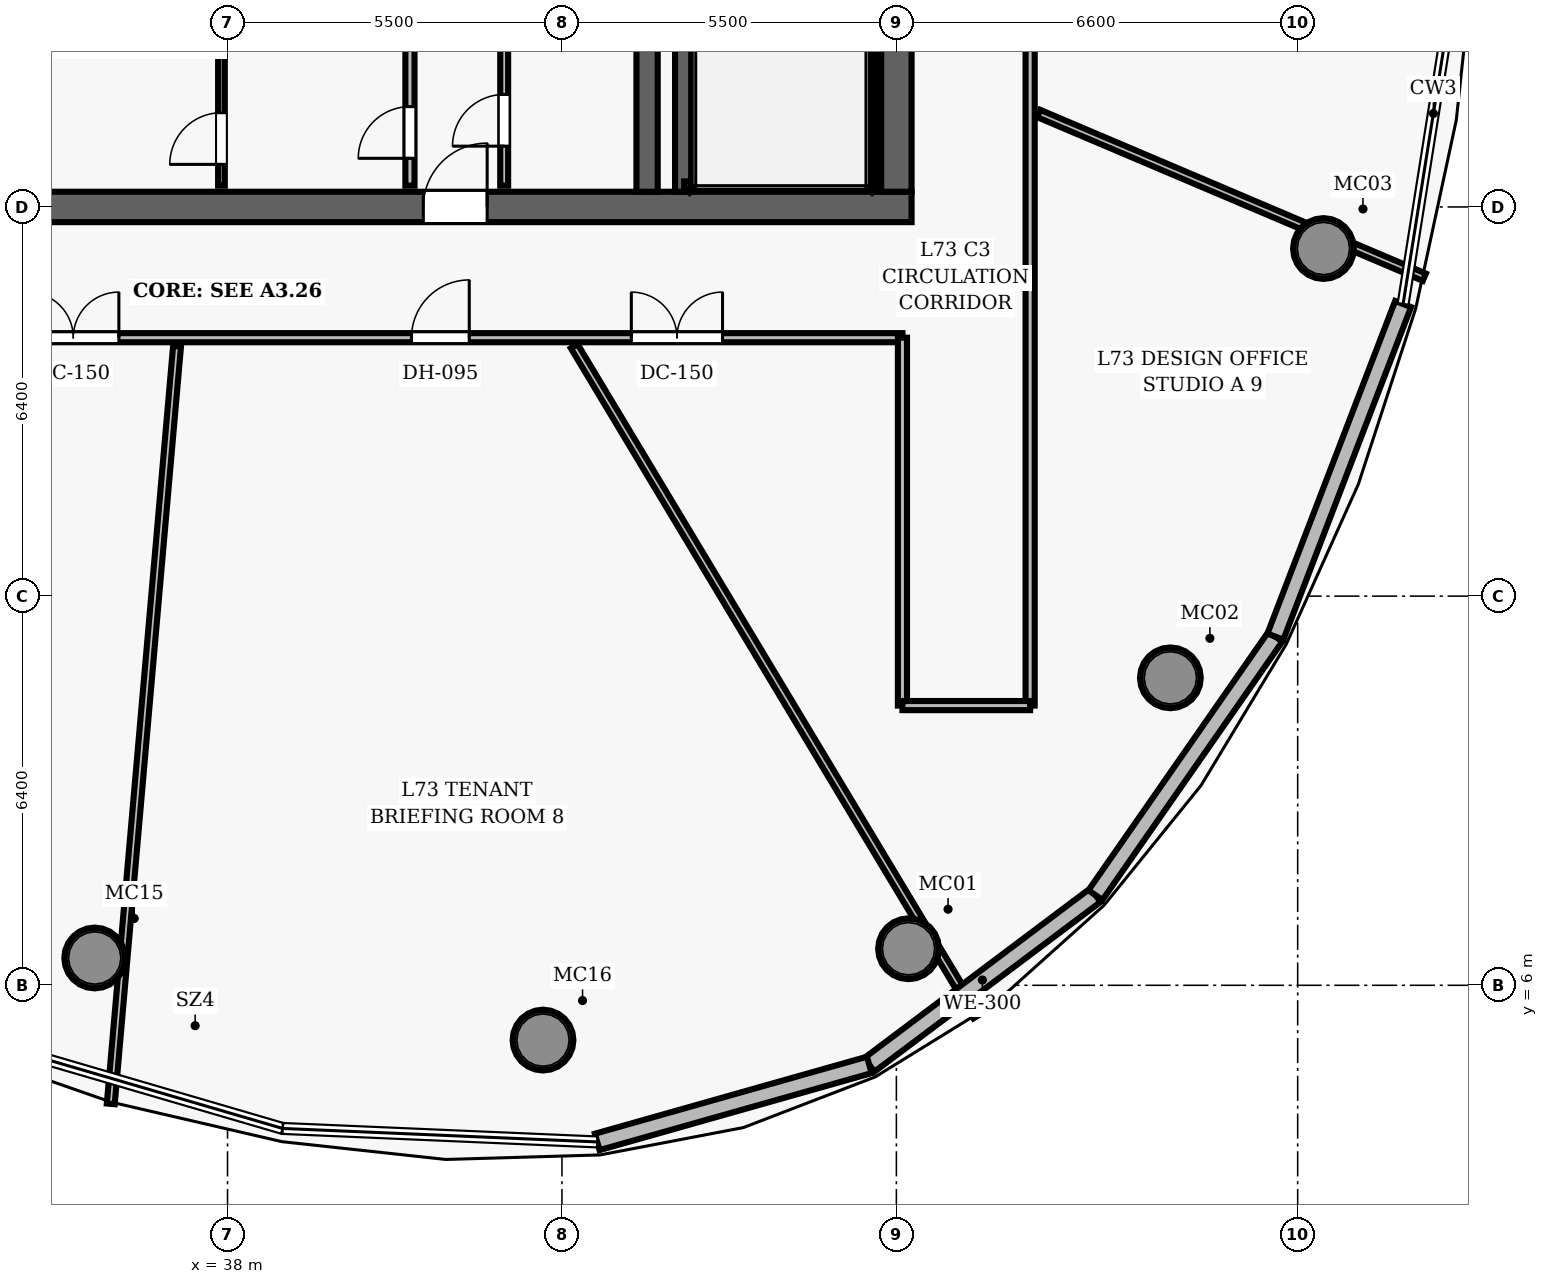
"""IFC4 building model, lengths in metres.
Left out: names, types, materials, properties, quantities, classifications, styles, units other than length and angle.
Written with IfcOpenShell. Run it as: python <this file> out.ifc"""

import sys

from ifc_helpers import new_model, si_unit, direction, frame, frame_2d, origin, origin_2d, place, context, subcontext, project, spatial, rectangle, hollow_circle, extrude, element, fill, save


model = new_model("IFC4")
c1 = context("Model", 3, precision=1e-05, world=origin(), true_north=direction((0.0, 1.0)))
c2 = subcontext(c1, "Body", "Model", "MODEL_VIEW")
j1 = project(units=[si_unit("LENGTHUNIT", "METRE"), si_unit("PLANEANGLEUNIT", "RADIAN")], contexts=[c1])
p1 = place(None, origin())
s1 = spatial("IfcSite", under=j1, at=p1, CompositionType="ELEMENT")
p2 = place(p1, origin())
s2 = spatial("IfcBuilding", under=s1, at=p2, CompositionType="ELEMENT")
p3 = place(p2, frame((0.0, 0.0, 288.25)))
s3 = spatial("IfcBuildingStorey", under=s2, at=p3, CompositionType="ELEMENT", Elevation=288.25)
p4 = place(p3, frame((26.75, 18.8, 0.0), z_axis=(0.0, 0.0, 1.0), x_axis=(1.0, 0.0, 0.0)))
e1 = element("IfcWall", 1, at=p4, inside=s3, PredefinedType="SHEAR", context=c2, shape_type="SweptSolid", body=[
    extrude(rectangle(XDim=22.5, YDim=0.5, at=frame_2d((11.25, 0.0))), origin(), (0.0, 0.0, 1.0), 3.85),
])
p5 = place(p4, frame((14.47, 0.0, 0.0)))
e2 = element("IfcOpeningElement", 2, at=p5, cuts=e1, PredefinedType="OPENING", context=c2, shape_type="SweptSolid", body=[
    extrude(rectangle(XDim=1.05, YDim=2.15, at=frame_2d((0.525, 1.075))), frame((0.0, 0.26, 0.0), z_axis=(0.0, -1.0, 0.0), x_axis=(1.0, 0.0, 0.0)), (0.0, 0.0, 1.0), 0.52),
])
p6 = place(p3, frame((49.0, 19.05, 0.0), z_axis=(0.0, 0.0, 1.0), x_axis=(0.0, 1.0, 0.0)))
e3 = element("IfcWall", 3, at=p6, inside=s3, PredefinedType="SHEAR", context=c2, shape_type="SweptSolid", body=[
    extrude(rectangle(XDim=13.9, YDim=0.5, at=frame_2d((6.95, 0.0))), origin(), (0.0, 0.0, 1.0), 3.85),
])
p7 = place(p6, frame((8.2, 0.0, 0.0)))
e4 = element("IfcOpeningElement", 4, at=p7, cuts=e3, PredefinedType="OPENING", context=c2, shape_type="SweptSolid", body=[
    extrude(rectangle(XDim=1.05, YDim=2.15, at=frame_2d((0.525, 1.075))), frame((0.0, 0.26, 0.0), z_axis=(0.0, -1.0, 0.0), x_axis=(1.0, 0.0, 0.0)), (0.0, 0.0, 1.0), 0.52),
])
p8 = place(p3, frame((44.9, 19.05, 0.0), z_axis=(0.0, 0.0, 1.0), x_axis=(0.0, 1.0, 0.0)))
e5 = element("IfcWall", 5, at=p8, inside=s3, PredefinedType="SHEAR", context=c2, shape_type="SweptSolid", body=[
    extrude(rectangle(XDim=13.9, YDim=0.35, at=frame_2d((6.95, 0.0))), origin(), (0.0, 0.0, 1.0), 3.85),
])
for number, where, z_axis, x_axis in (
    (6, (49.2, 6.601, 0.0), (0.0, 0.0, 1.0), (1.0, 0.0, 0.0)),
    (7, (53.506, 11.056, 0.0), (0.0, 0.0, 1.0), (1.0, 0.0, 0.0)),
    (8, (56.024, 18.116, 0.0), (0.0, 0.0, 1.0), (1.0, 0.0, 0.0)),
    (9, (35.815, 6.449, 0.0), (0.0, 0.0, 1.0), (1.0, 0.0, 0.0)),
    (10, (43.188, 5.099, 0.0), (0.0, 0.0, 1.0), (1.0, 0.0, 0.0)),
):
    element("IfcColumn", number, at=place(p3, frame(where, z_axis=z_axis, x_axis=x_axis)), inside=s3, PredefinedType="COLUMN", context=c2, shape_type="SweptSolid", body=[
        extrude(hollow_circle(Radius=0.5, WallThickness=0.045, at=origin_2d()), origin(), (0.0, 0.0, 1.0), 3.85),
    ])
p9 = place(p3, frame((45.51, 19.05, 0.0), z_axis=(0.0, 0.0, 1.0), x_axis=(0.0, 1.0, 0.0)))
e11 = element("IfcWall", 11, at=p9, inside=s3, PredefinedType="SHEAR", context=c2, shape_type="SweptSolid", body=[
    extrude(rectangle(XDim=7.5, YDim=0.3, at=frame_2d((3.75, 0.0))), origin(), (0.0, 0.0, 1.0), 3.85),
])
p10 = place(p3, frame((48.605, 19.1, 0.0), z_axis=(0.0, 0.0, 1.0), x_axis=(0.0, 1.0, 0.0)))
e12 = element("IfcWall", 12, at=p10, inside=s3, PredefinedType="SHEAR", context=c2, shape_type="SweptSolid", body=[
    extrude(rectangle(XDim=7.45, YDim=0.12, at=frame_2d((3.725, 0.0))), origin(), (0.0, 0.0, 1.0), 3.85),
])
p11 = place(p3, frame((45.51, 19.16, 0.0), z_axis=(0.0, 0.0, 1.0), x_axis=(1.0, 0.0, 0.0)))
e13 = element("IfcWall", 13, at=p11, inside=s3, PredefinedType="SHEAR", context=c2, shape_type="SweptSolid", body=[
    extrude(rectangle(XDim=3.095, YDim=0.12, at=frame_2d((1.547, 0.0))), origin(), (0.0, 0.0, 1.0), 3.85),
])
p12 = place(p3, frame((41.0, 19.15, 0.0), z_axis=(0.0, 0.0, 1.0), x_axis=(0.0, 1.0, 0.0)))
e14 = element("IfcWall", 14, at=p12, inside=s3, PredefinedType="PARTITIONING", context=c2, shape_type="SweptSolid", body=[
    extrude(rectangle(XDim=7.95, YDim=0.15, at=frame_2d((3.975, 0.0))), origin(), (0.0, 0.0, 1.0), 3.04),
])
p13 = place(p12, frame((4.425, 0.0, 0.0)))
e15 = element("IfcOpeningElement", 15, at=p13, cuts=e14, PredefinedType="OPENING", context=c2, shape_type="SweptSolid", body=[
    extrude(rectangle(XDim=0.85, YDim=2.1, at=frame_2d((0.425, 1.05))), frame((0.0, 0.085, 0.0), z_axis=(0.0, -1.0, 0.0), x_axis=(1.0, 0.0, 0.0)), (0.0, 0.0, 1.0), 0.17),
])
p14 = place(p12, frame((0.45, 0.0, 0.0)))
e16 = element("IfcOpeningElement", 16, at=p14, cuts=e14, PredefinedType="OPENING", context=c2, shape_type="SweptSolid", body=[
    extrude(rectangle(XDim=0.85, YDim=2.1, at=frame_2d((0.425, 1.05))), frame((0.0, 0.085, 0.0), z_axis=(0.0, -1.0, 0.0), x_axis=(1.0, 0.0, 0.0)), (0.0, 0.0, 1.0), 0.17),
])
p15 = place(p3, frame((37.9, 19.15, 0.0), z_axis=(0.0, 0.0, 1.0), x_axis=(0.0, 1.0, 0.0)))
e17 = element("IfcWall", 17, at=p15, inside=s3, PredefinedType="PARTITIONING", context=c2, shape_type="SweptSolid", body=[
    extrude(rectangle(XDim=3.975, YDim=0.11, at=frame_2d((1.988, 0.0))), origin(), (0.0, 0.0, 1.0), 3.04),
])
p16 = place(p15, frame((0.35, 0.0, 0.0)))
e18 = element("IfcOpeningElement", 18, at=p16, cuts=e17, PredefinedType="OPENING", context=c2, shape_type="SweptSolid", body=[
    extrude(rectangle(XDim=0.85, YDim=2.1, at=frame_2d((0.425, 1.05))), frame((0.0, 0.065, 0.0), z_axis=(0.0, -1.0, 0.0), x_axis=(1.0, 0.0, 0.0)), (0.0, 0.0, 1.0), 0.13),
])
p17 = place(p3, frame((42.55, 19.15, 0.0), z_axis=(0.0, 0.0, 1.0), x_axis=(0.0, 1.0, 0.0)))
e19 = element("IfcWall", 19, at=p17, inside=s3, PredefinedType="PARTITIONING", context=c2, shape_type="SweptSolid", body=[
    extrude(rectangle(XDim=2.75, YDim=0.13, at=frame_2d((1.375, 0.0))), origin(), (0.0, 0.0, 1.0), 3.04),
])
p18 = place(p17, frame((0.65, 0.0, 0.0)))
e20 = element("IfcOpeningElement", 20, at=p18, cuts=e19, PredefinedType="OPENING", context=c2, shape_type="SweptSolid", body=[
    extrude(rectangle(XDim=0.85, YDim=2.1, at=frame_2d((0.425, 1.05))), frame((0.0, 0.075, 0.0), z_axis=(0.0, -1.0, 0.0), x_axis=(1.0, 0.0, 0.0)), (0.0, 0.0, 1.0), 0.15),
])
p19 = place(p3, frame((26.9, 16.65, 0.0), z_axis=(0.0, 0.0, 1.0), x_axis=(1.0, 0.0, 0.0)))
e21 = element("IfcWall", 21, at=p19, inside=s3, PredefinedType="PARTITIONING", context=c2, shape_type="SweptSolid", body=[
    extrude(rectangle(XDim=22.2, YDim=0.15, at=frame_2d((11.1, 0.0))), origin(), (0.0, 0.0, 1.0), 3.04),
])
p20 = place(p19, frame((7.813, 0.0, 0.0)))
e22 = element("IfcOpeningElement", 22, at=p20, cuts=e21, PredefinedType="OPENING", context=c2, shape_type="SweptSolid", body=[
    extrude(rectangle(XDim=1.5, YDim=2.2, at=frame_2d((0.75, 1.1))), frame((0.0, 0.085, 0.0), z_axis=(0.0, -1.0, 0.0), x_axis=(1.0, 0.0, 0.0)), (0.0, 0.0, 1.0), 0.17),
])
p21 = place(p19, frame((14.125, 0.0, 0.0)))
e23 = element("IfcOpeningElement", 23, at=p21, cuts=e21, PredefinedType="OPENING", context=c2, shape_type="SweptSolid", body=[
    extrude(rectangle(XDim=0.95, YDim=2.15, at=frame_2d((0.475, 1.075))), frame((0.0, 0.085, 0.0), z_axis=(0.0, -1.0, 0.0), x_axis=(1.0, 0.0, 0.0)), (0.0, 0.0, 1.0), 0.17),
])
p22 = place(p19, frame((17.741, 0.0, 0.0)))
e24 = element("IfcOpeningElement", 24, at=p22, cuts=e21, PredefinedType="OPENING", context=c2, shape_type="SweptSolid", body=[
    extrude(rectangle(XDim=1.5, YDim=2.2, at=frame_2d((0.75, 1.1))), frame((0.0, 0.085, 0.0), z_axis=(0.0, -1.0, 0.0), x_axis=(1.0, 0.0, 0.0)), (0.0, 0.0, 1.0), 0.17),
])
p23 = place(p3, frame((51.2, 10.6, 0.0), z_axis=(0.0, 0.0, 1.0), x_axis=(0.0, 1.0, 0.0)))
e25 = element("IfcWall", 25, at=p23, inside=s3, PredefinedType="PARTITIONING", context=c2, shape_type="SweptSolid", body=[
    extrude(rectangle(XDim=30.8, YDim=0.15, at=frame_2d((15.4, 0.0))), origin(), (0.0, 0.0, 1.0), 3.04),
])
p24 = place(p23, frame((20.584, 0.0, 0.0)))
e26 = element("IfcOpeningElement", 26, at=p24, cuts=e25, PredefinedType="OPENING", context=c2, shape_type="SweptSolid", body=[
    extrude(rectangle(XDim=1.5, YDim=2.2, at=frame_2d((0.75, 1.1))), frame((0.0, 0.085, 0.0), z_axis=(0.0, -1.0, 0.0), x_axis=(1.0, 0.0, 0.0)), (0.0, 0.0, 1.0), 0.17),
])
p25 = place(p23, frame((11.03, 0.0, 0.0)))
e27 = element("IfcOpeningElement", 27, at=p25, cuts=e25, PredefinedType="OPENING", context=c2, shape_type="SweptSolid", body=[
    extrude(rectangle(XDim=1.5, YDim=2.2, at=frame_2d((0.75, 1.1))), frame((0.0, 0.085, 0.0), z_axis=(0.0, -1.0, 0.0), x_axis=(1.0, 0.0, 0.0)), (0.0, 0.0, 1.0), 0.17),
])
p26 = place(p3, frame((49.1, 10.6, 0.0), z_axis=(0.0, 0.0, 1.0), x_axis=(0.0, 1.0, 0.0)))
e28 = element("IfcWall", 28, at=p26, inside=s3, PredefinedType="PARTITIONING", context=c2, shape_type="SweptSolid", body=[
    extrude(rectangle(XDim=6.05, YDim=0.15, at=frame_2d((3.025, 0.0))), origin(), (0.0, 0.0, 1.0), 3.04),
])
p27 = place(p3, frame((49.1, 10.6, 0.0), z_axis=(0.0, 0.0, 1.0), x_axis=(1.0, 0.0, 0.0)))
e29 = element("IfcWall", 29, at=p27, inside=s3, PredefinedType="PARTITIONING", context=c2, shape_type="SweptSolid", body=[
    extrude(rectangle(XDim=2.1, YDim=0.15, at=frame_2d((1.05, 0.0))), origin(), (0.0, 0.0, 1.0), 3.04),
])
p28 = place(p3, frame((37.17, 16.51, 0.0), z_axis=(0.0, 0.0, 1.0), x_axis=(-0.087154359031, -0.99619481915, 0.0)))
e30 = element("IfcWall", 30, at=p28, inside=s3, PredefinedType="PARTITIONING", context=c2, shape_type="SweptSolid", body=[
    extrude(rectangle(XDim=12.508, YDim=0.13, at=frame_2d((6.254, 0.0))), origin(), (0.0, 0.0, 1.0), 3.04),
])
p29 = place(p3, frame((43.702, 16.51, 0.0), z_axis=(0.0, 0.0, 1.0), x_axis=(0.515034621958, -0.857169375436, 0.0)))
e31 = element("IfcWall", 31, at=p29, inside=s3, PredefinedType="PARTITIONING", context=c2, shape_type="SweptSolid", body=[
    extrude(rectangle(XDim=12.857, YDim=0.13, at=frame_2d((6.428, 0.0))), origin(), (0.0, 0.0, 1.0), 3.04),
])
p30 = place(p3, frame((51.34, 20.337, 0.0), z_axis=(0.0, 0.0, 1.0), x_axis=(0.920508424037, -0.390722716612, 0.0)))
e32 = element("IfcWall", 32, at=p30, inside=s3, PredefinedType="PARTITIONING", context=c2, shape_type="SweptSolid", body=[
    extrude(rectangle(XDim=6.891, YDim=0.13, at=frame_2d((3.445, 0.0))), origin(), (0.0, 0.0, 1.0), 3.04),
])
p31 = place(p3, frame((52.274, 7.483, 0.0), z_axis=(0.0, 0.0, 1.0), x_axis=(-0.799735338647, -0.600352719756, 0.0)))
e33 = element("IfcWall", 33, at=p31, inside=s3, PredefinedType="SOLIDWALL", context=c2, shape_type="SweptSolid", body=[
    extrude(rectangle(XDim=4.651, YDim=0.28, at=frame_2d((2.325, 0.0))), origin(), (0.0, 0.0, 1.0), 3.625),
])
p32 = place(p3, frame((55.233, 11.733, 0.0), z_axis=(0.0, 0.0, 1.0), x_axis=(-0.571372443158, -0.820690886509, 0.0)))
e34 = element("IfcWall", 34, at=p32, inside=s3, PredefinedType="SOLIDWALL", context=c2, shape_type="SweptSolid", body=[
    extrude(rectangle(XDim=5.179, YDim=0.28, at=frame_2d((2.59, 0.0))), origin(), (0.0, 0.0, 1.0), 3.625),
])
p33 = place(p3, frame((57.334, 17.204, 0.0), z_axis=(0.0, 0.0, 1.0), x_axis=(-0.358468117359, -0.93354196951, 0.0)))
e35 = element("IfcWall", 35, at=p33, inside=s3, PredefinedType="SOLIDWALL", context=c2, shape_type="SweptSolid", body=[
    extrude(rectangle(XDim=5.86, YDim=0.28, at=frame_2d((2.93, 0.0))), origin(), (0.0, 0.0, 1.0), 3.625),
])
p34 = place(p3, frame((48.555, 4.691, 0.0), z_axis=(0.0, 0.0, 1.0), x_axis=(-0.962194624713, -0.272362817165, 0.0)))
e36 = element("IfcWall", 36, at=p34, inside=s3, PredefinedType="SOLIDWALL", context=c2, shape_type="SweptSolid", body=[
    extrude(rectangle(XDim=4.65, YDim=0.28, at=frame_2d((2.325, 0.0))), origin(), (0.0, 0.0, 1.0), 3.625),
])
p35 = place(p5, origin())
e37 = element("IfcDoor", 37, at=p35, inside=s3, OperationType="SINGLE_SWING_RIGHT", PredefinedType="DOOR", context=c2, shape_type="SweptSolid", body=[
    extrude(rectangle(XDim=1.05, YDim=2.15, at=frame_2d((0.525, 1.075))), frame((0.0, 0.025, 0.0), z_axis=(0.0, -1.0, 0.0), x_axis=(1.0, 0.0, 0.0)), (0.0, 0.0, 1.0), 0.05),
])
fill(e2, e37)
p36 = place(p14, origin())
e38 = element("IfcDoor", 38, at=p36, inside=s3, OperationType="SINGLE_SWING_LEFT", PredefinedType="DOOR", context=c2, shape_type="SweptSolid", body=[
    extrude(rectangle(XDim=0.85, YDim=2.1, at=frame_2d((0.425, 1.05))), frame((0.0, 0.025, 0.0), z_axis=(0.0, -1.0, 0.0), x_axis=(1.0, 0.0, 0.0)), (0.0, 0.0, 1.0), 0.05),
])
fill(e16, e38)
p37 = place(p16, origin())
e39 = element("IfcDoor", 39, at=p37, inside=s3, OperationType="SINGLE_SWING_LEFT", PredefinedType="DOOR", context=c2, shape_type="SweptSolid", body=[
    extrude(rectangle(XDim=0.85, YDim=2.1, at=frame_2d((0.425, 1.05))), frame((0.0, 0.025, 0.0), z_axis=(0.0, -1.0, 0.0), x_axis=(1.0, 0.0, 0.0)), (0.0, 0.0, 1.0), 0.05),
])
fill(e18, e39)
p38 = place(p18, origin())
e40 = element("IfcDoor", 40, at=p38, inside=s3, OperationType="SINGLE_SWING_LEFT", PredefinedType="DOOR", context=c2, shape_type="SweptSolid", body=[
    extrude(rectangle(XDim=0.85, YDim=2.1, at=frame_2d((0.425, 1.05))), frame((0.0, 0.025, 0.0), z_axis=(0.0, -1.0, 0.0), x_axis=(1.0, 0.0, 0.0)), (0.0, 0.0, 1.0), 0.05),
])
fill(e20, e40)
p39 = place(p20, origin())
e41 = element("IfcDoor", 41, at=p39, inside=s3, OperationType="DOUBLE_DOOR_SINGLE_SWING", PredefinedType="DOOR", context=c2, shape_type="SweptSolid", body=[
    extrude(rectangle(XDim=1.5, YDim=2.2, at=frame_2d((0.75, 1.1))), frame((0.0, 0.025, 0.0), z_axis=(0.0, -1.0, 0.0), x_axis=(1.0, 0.0, 0.0)), (0.0, 0.0, 1.0), 0.05),
])
fill(e22, e41)
p40 = place(p21, origin())
e42 = element("IfcDoor", 42, at=p40, inside=s3, OperationType="SINGLE_SWING_RIGHT", PredefinedType="DOOR", context=c2, shape_type="SweptSolid", body=[
    extrude(rectangle(XDim=0.95, YDim=2.15, at=frame_2d((0.475, 1.075))), frame((0.0, 0.025, 0.0), z_axis=(0.0, -1.0, 0.0), x_axis=(1.0, 0.0, 0.0)), (0.0, 0.0, 1.0), 0.05),
])
fill(e23, e42)
p41 = place(p22, origin())
e43 = element("IfcDoor", 43, at=p41, inside=s3, OperationType="DOUBLE_DOOR_SINGLE_SWING", PredefinedType="DOOR", context=c2, shape_type="SweptSolid", body=[
    extrude(rectangle(XDim=1.5, YDim=2.2, at=frame_2d((0.75, 1.1))), frame((0.0, 0.025, 0.0), z_axis=(0.0, -1.0, 0.0), x_axis=(1.0, 0.0, 0.0)), (0.0, 0.0, 1.0), 0.05),
])
fill(e24, e43)
save(model, sys.argv[1])
